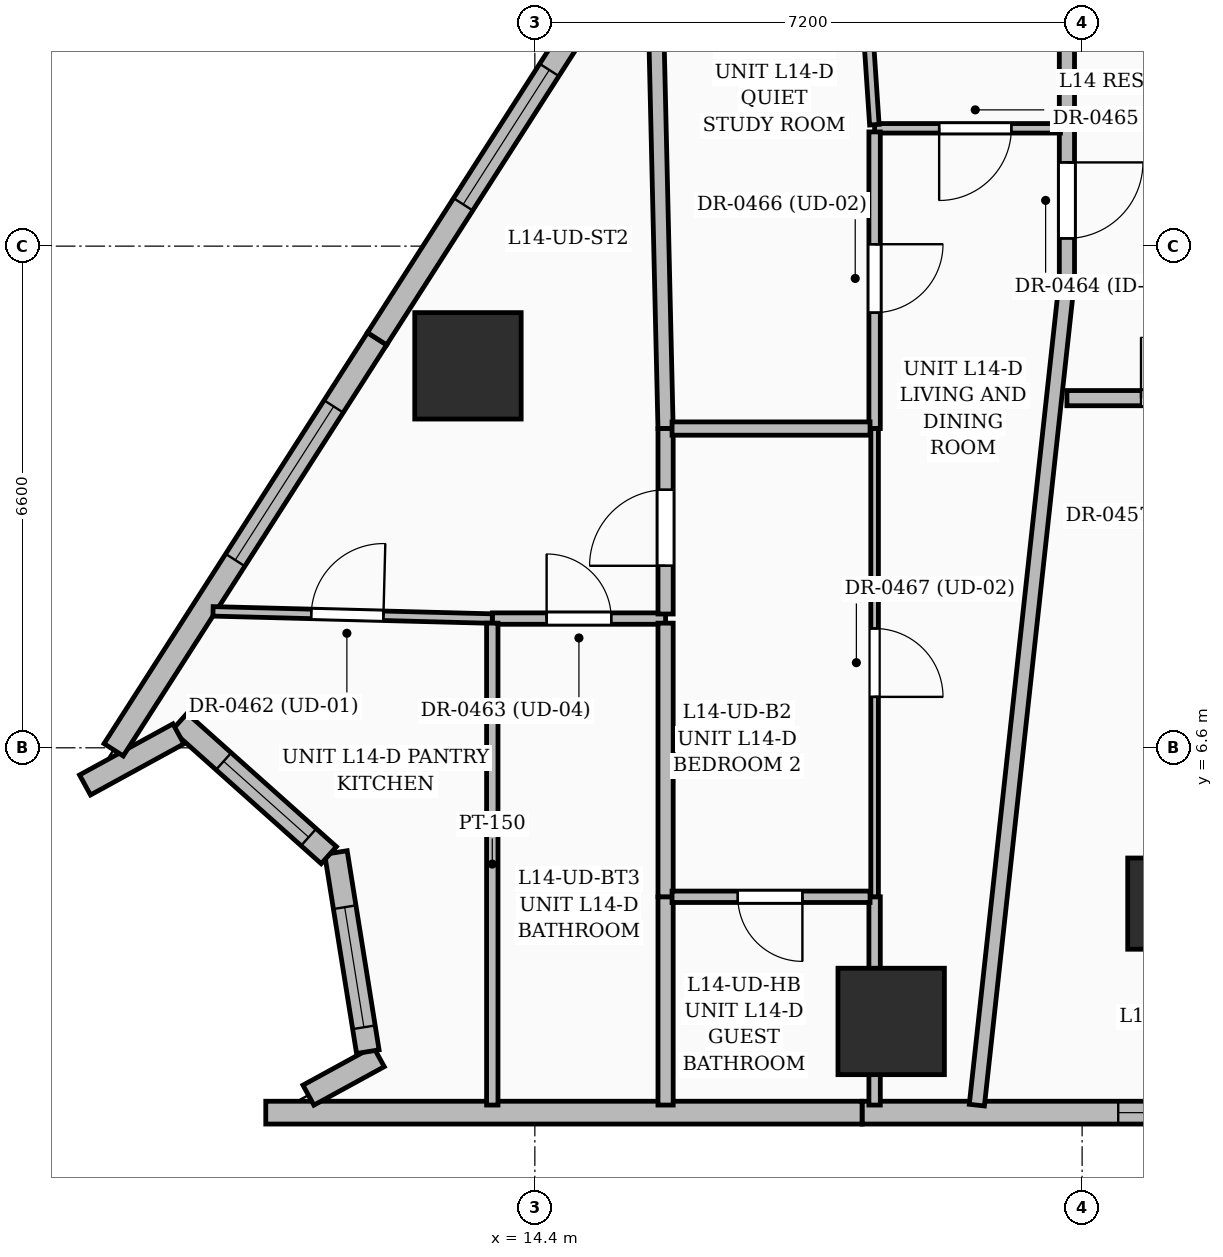
"""IFC4 building model, lengths in metres.
Left out: names, types, materials, properties, quantities, classifications, styles, units other than length and angle.
Written with IfcOpenShell. Run it as: python <this file> out.ifc"""

import sys

from ifc_helpers import new_model, si_unit, direction, frame, frame_2d, origin, origin_2d, place, context, subcontext, project, spatial, rectangle, extrude, element, fill, save


model = new_model("IFC4")
c1 = context("Model", 3, precision=1e-05, world=origin(), true_north=direction((0.0, 1.0)))
c2 = subcontext(c1, "Body", "Model", "MODEL_VIEW")
j1 = project(units=[si_unit("LENGTHUNIT", "METRE"), si_unit("PLANEANGLEUNIT", "RADIAN")], contexts=[c1])
p1 = place(None, origin())
s1 = spatial("IfcSite", under=j1, at=p1, CompositionType="ELEMENT")
p2 = place(p1, origin())
s2 = spatial("IfcBuilding", under=s1, at=p2, CompositionType="ELEMENT")
p3 = place(p2, frame((0.0, 0.0, 60.6)))
s3 = spatial("IfcBuildingStorey", under=s2, at=p3, CompositionType="ELEMENT", Elevation=60.6)
p4 = place(p3, frame((22.8, 4.55, 0.0), z_axis=(0.0, 0.0, 1.0), x_axis=(1.0, 0.0, 0.0)))
e1 = element("IfcColumn", 1, at=p4, inside=s3, PredefinedType="COLUMN", context=c2, shape_type="SweptSolid", body=[
    extrude(rectangle(XDim=1.2, YDim=1.2, at=origin_2d()), origin(), (0.0, 0.0, 1.0), 3.6),
])
for number, where, z_axis, x_axis in (
    (2, (19.088, 3.0, 0.0), (0.0, 0.0, 1.0), (1.0, 0.0, 0.0)),
    (3, (13.52, 11.625, 0.0), (0.0, 0.0, 1.0), (1.0, 0.0, 0.0)),
):
    element("IfcColumn", number, at=place(p3, frame(where, z_axis=z_axis, x_axis=x_axis)), inside=s3, PredefinedType="COLUMN", context=c2, shape_type="SweptSolid", body=[
        extrude(rectangle(XDim=1.4, YDim=1.4, at=origin_2d()), origin(), (0.0, 0.0, 1.0), 3.6),
    ])
p5 = place(p3, frame((26.55, 1.8, 0.0), z_axis=(0.0, 0.0, 1.0), x_axis=(-1.0, 0.0, 0.0)))
e4 = element("IfcWall", 4, at=p5, inside=s3, PredefinedType="SOLIDWALL", context=c2, shape_type="SweptSolid", body=[
    extrude(rectangle(XDim=7.845, YDim=0.3, at=frame_2d((3.922, 0.0))), origin(), (0.0, 0.0, 1.0), 3.35),
])
p6 = place(p5, frame((2.075, 0.0, 0.6)))
e5 = element("IfcOpeningElement", 5, at=p6, cuts=e4, PredefinedType="OPENING", context=c2, shape_type="SweptSolid", body=[
    extrude(rectangle(XDim=2.4, YDim=2.1, at=frame_2d((1.2, 1.05))), frame((0.0, 0.16, 0.0), z_axis=(0.0, -1.0, 0.0), x_axis=(1.0, 0.0, 0.0)), (0.0, 0.0, 1.0), 0.32),
])
p7 = place(p3, frame((18.705, 1.8, 0.0), z_axis=(0.0, 0.0, 1.0), x_axis=(-1.0, 0.0, 0.0)))
e6 = element("IfcWall", 6, at=p7, inside=s3, PredefinedType="SOLIDWALL", context=c2, shape_type="SweptSolid", body=[
    extrude(rectangle(XDim=7.845, YDim=0.3, at=frame_2d((3.922, 0.0))), origin(), (0.0, 0.0, 1.0), 3.35),
])
p8 = place(p3, frame((11.421, 2.03, 0.0), z_axis=(0.0, 0.0, 1.0), x_axis=(0.877488347229, 0.479597957124, 0.0)))
e7 = element("IfcWall", 7, at=p8, inside=s3, PredefinedType="SOLIDWALL", context=c2, shape_type="SweptSolid", body=[
    extrude(rectangle(XDim=1.055, YDim=0.3, at=frame_2d((0.527, 0.0))), origin(), (0.0, 0.0, 1.0), 3.35),
])
p9 = place(p3, frame((12.203, 2.602, 0.0), z_axis=(0.0, 0.0, 1.0), x_axis=(-0.158173523246, 0.987411330978, 0.0)))
e8 = element("IfcWall", 8, at=p9, inside=s3, PredefinedType="SOLIDWALL", context=c2, shape_type="SweptSolid", body=[
    extrude(rectangle(XDim=2.653, YDim=0.3, at=frame_2d((1.327, 0.0))), origin(), (0.0, 0.0, 1.0), 3.35),
])
p10 = place(p9, frame((0.325, 0.0, 0.55)))
e9 = element("IfcOpeningElement", 9, at=p10, cuts=e8, PredefinedType="OPENING", context=c2, shape_type="SweptSolid", body=[
    extrude(rectangle(XDim=1.6, YDim=2.2, at=frame_2d((0.8, 1.1))), frame((0.0, 0.16, 0.0), z_axis=(0.0, -1.0, 0.0), x_axis=(1.0, 0.0, 0.0)), (0.0, 0.0, 1.0), 0.32),
])
p11 = place(p3, frame((11.689, 5.187, 0.0), z_axis=(0.0, 0.0, 1.0), x_axis=(-0.745975491387, 0.665973397555, 0.0)))
e10 = element("IfcWall", 10, at=p11, inside=s3, PredefinedType="SOLIDWALL", context=c2, shape_type="SweptSolid", body=[
    extrude(rectangle(XDim=2.634, YDim=0.3, at=frame_2d((1.317, 0.0))), origin(), (0.0, 0.0, 1.0), 3.35),
])
p12 = place(p11, frame((0.355, 0.0, 0.6)))
e11 = element("IfcOpeningElement", 11, at=p12, cuts=e10, PredefinedType="OPENING", context=c2, shape_type="SweptSolid", body=[
    extrude(rectangle(XDim=1.5, YDim=2.1, at=frame_2d((0.75, 1.05))), frame((0.0, 0.16, 0.0), z_axis=(0.0, -1.0, 0.0), x_axis=(1.0, 0.0, 0.0)), (0.0, 0.0, 1.0), 0.32),
])
p13 = place(p3, frame((9.711, 6.783, 0.0), z_axis=(0.0, 0.0, 1.0), x_axis=(-0.877215145436, -0.480097478245, 0.0)))
e12 = element("IfcWall", 12, at=p13, inside=s3, PredefinedType="SOLIDWALL", context=c2, shape_type="SweptSolid", body=[
    extrude(rectangle(XDim=1.4, YDim=0.3, at=frame_2d((0.7, 0.0))), origin(), (0.0, 0.0, 1.0), 3.35),
])
p14 = place(p3, frame((8.859, 6.574, 0.0), z_axis=(0.0, 0.0, 1.0), x_axis=(0.539539001193, 0.841960608456, 0.0)))
e13 = element("IfcWall", 13, at=p14, inside=s3, PredefinedType="SOLIDWALL", context=c2, shape_type="SweptSolid", body=[
    extrude(rectangle(XDim=6.423, YDim=0.3, at=frame_2d((3.211, 0.0))), origin(), (0.0, 0.0, 1.0), 3.35),
])
p15 = place(p14, frame((2.965, 0.0, 0.6)))
e14 = element("IfcOpeningElement", 14, at=p15, cuts=e13, PredefinedType="OPENING", context=c2, shape_type="SweptSolid", body=[
    extrude(rectangle(XDim=2.4, YDim=2.1, at=frame_2d((1.2, 1.05))), frame((0.0, 0.16, 0.0), z_axis=(0.0, -1.0, 0.0), x_axis=(1.0, 0.0, 0.0)), (0.0, 0.0, 1.0), 0.32),
])
p16 = place(p3, frame((12.324, 11.981, 0.0), z_axis=(0.0, 0.0, 1.0), x_axis=(0.539544650361, 0.841956988371, 0.0)))
e15 = element("IfcWall", 15, at=p16, inside=s3, PredefinedType="SOLIDWALL", context=c2, shape_type="SweptSolid", body=[
    extrude(rectangle(XDim=6.758, YDim=0.3, at=frame_2d((3.379, 0.0))), origin(), (0.0, 0.0, 1.0), 3.35),
])
p17 = place(p16, frame((2.1, 0.0, 0.55)))
e16 = element("IfcOpeningElement", 16, at=p17, cuts=e15, PredefinedType="OPENING", context=c2, shape_type="SweptSolid", body=[
    extrude(rectangle(XDim=2.1, YDim=2.4, at=frame_2d((1.05, 1.2))), frame((0.0, 0.16, 0.0), z_axis=(0.0, -1.0, 0.0), x_axis=(1.0, 0.0, 0.0)), (0.0, 0.0, 1.0), 0.32),
])
p18 = place(p3, frame((21.4, 11.2, 0.0), z_axis=(0.0, 0.0, 1.0), x_axis=(1.0, 0.0, 0.0)))
e17 = element("IfcWall", 17, at=p18, inside=s3, PredefinedType="PARTITIONING", context=c2, shape_type="SweptSolid", body=[
    extrude(rectangle(XDim=3.469, YDim=0.2, at=frame_2d((1.735, 0.0))), origin(), (0.0, 0.0, 1.0), 2.712),
])
p19 = place(p18, frame((0.975, 0.0, 0.0)))
e18 = element("IfcOpeningElement", 18, at=p19, cuts=e17, PredefinedType="OPENING", context=c2, shape_type="SweptSolid", body=[
    extrude(rectangle(XDim=1.6, YDim=2.3, at=frame_2d((0.8, 1.15))), frame((0.0, 0.11, 0.0), z_axis=(0.0, -1.0, 0.0), x_axis=(1.0, 0.0, 0.0)), (0.0, 0.0, 1.0), 0.22),
])
p20 = place(p3, frame((21.4, 14.75, 0.0), z_axis=(0.0, 0.0, 1.0), x_axis=(0.0, -1.0, 0.0)))
e19 = element("IfcWall", 19, at=p20, inside=s3, PredefinedType="PARTITIONING", context=c2, shape_type="SweptSolid", body=[
    extrude(rectangle(XDim=2.0, YDim=0.2, at=frame_2d((1.0, 0.0))), origin(), (0.0, 0.0, 1.0), 2.712),
])
p21 = place(p20, frame((0.448, 0.0, 0.0)))
e20 = element("IfcOpeningElement", 20, at=p21, cuts=e19, PredefinedType="OPENING", context=c2, shape_type="SweptSolid", body=[
    extrude(rectangle(XDim=1.0, YDim=2.2, at=frame_2d((0.5, 1.1))), frame((0.0, 0.11, 0.0), z_axis=(0.0, -1.0, 0.0), x_axis=(1.0, 0.0, 0.0)), (0.0, 0.0, 1.0), 0.22),
])
p22 = place(p3, frame((21.4, 17.75, 0.0), z_axis=(0.0, 0.0, 1.0), x_axis=(0.0, -1.0, 0.0)))
e21 = element("IfcWall", 21, at=p22, inside=s3, PredefinedType="PARTITIONING", context=c2, shape_type="SweptSolid", body=[
    extrude(rectangle(XDim=3.0, YDim=0.2, at=frame_2d((1.5, 0.0))), origin(), (0.0, 0.0, 1.0), 3.35),
])
p23 = place(p3, frame((13.84, 8.3, 0.0), z_axis=(0.0, 0.0, 1.0), x_axis=(1.0, 0.0, 0.0)))
e22 = element("IfcWall", 22, at=p23, inside=s3, PredefinedType="PARTITIONING", context=c2, shape_type="SweptSolid", body=[
    extrude(rectangle(XDim=2.28, YDim=0.15, at=frame_2d((1.14, 0.0))), origin(), (0.0, 0.0, 1.0), 2.37),
])
p24 = place(p23, frame((0.715, 0.0, 0.0)))
e23 = element("IfcOpeningElement", 23, at=p24, cuts=e22, PredefinedType="OPENING", context=c2, shape_type="SweptSolid", body=[
    extrude(rectangle(XDim=0.85, YDim=2.1, at=frame_2d((0.425, 1.05))), frame((0.0, 0.085, 0.0), z_axis=(0.0, -1.0, 0.0), x_axis=(1.0, 0.0, 0.0)), (0.0, 0.0, 1.0), 0.17),
])
p25 = place(p3, frame((10.166, 8.395, 0.0), z_axis=(0.0, 0.0, 1.0), x_axis=(0.999666084673, -0.025840262272, 0.0)))
e24 = element("IfcWall", 24, at=p25, inside=s3, PredefinedType="PARTITIONING", context=c2, shape_type="SweptSolid", body=[
    extrude(rectangle(XDim=3.675, YDim=0.125, at=frame_2d((1.838, 0.0))), origin(), (0.0, 0.0, 1.0), 3.35),
])
p26 = place(p25, frame((1.293, 0.0, 0.0)))
e25 = element("IfcOpeningElement", 25, at=p26, cuts=e24, PredefinedType="OPENING", context=c2, shape_type="SweptSolid", body=[
    extrude(rectangle(XDim=0.95, YDim=2.2, at=frame_2d((0.475, 1.1))), frame((0.0, 0.072, 0.0), z_axis=(0.0, -1.0, 0.0), x_axis=(1.0, 0.0, 0.0)), (0.0, 0.0, 1.0), 0.145),
])
p27 = place(p3, frame((16.12, 10.8, 0.0), z_axis=(0.0, 0.0, 1.0), x_axis=(-0.023345842867, 0.999727448668, 0.0)))
e26 = element("IfcWall", 26, at=p27, inside=s3, PredefinedType="PARTITIONING", context=c2, shape_type="SweptSolid", body=[
    extrude(rectangle(XDim=6.599, YDim=0.2, at=frame_2d((3.299, 0.0))), origin(), (0.0, 0.0, 1.0), 2.279),
])
p28 = place(p3, frame((16.12, 8.36, 0.0), z_axis=(0.0, 0.0, 1.0), x_axis=(0.0, 1.0, 0.0)))
e27 = element("IfcWall", 27, at=p28, inside=s3, PredefinedType="PARTITIONING", context=c2, shape_type="SweptSolid", body=[
    extrude(rectangle(XDim=2.44, YDim=0.2, at=frame_2d((1.22, 0.0))), origin(), (0.0, 0.0, 1.0), 2.279),
])
p29 = place(p28, frame((0.635, 0.0, 0.0)))
e28 = element("IfcOpeningElement", 28, at=p29, cuts=e27, PredefinedType="OPENING", context=c2, shape_type="SweptSolid", body=[
    extrude(rectangle(XDim=1.0, YDim=2.2, at=frame_2d((0.5, 1.1))), frame((0.0, 0.11, 0.0), z_axis=(0.0, -1.0, 0.0), x_axis=(1.0, 0.0, 0.0)), (0.0, 0.0, 1.0), 0.22),
])
p30 = place(p3, frame((13.84, 8.24, 0.0), z_axis=(0.0, 0.0, 1.0), x_axis=(0.0, -1.0, 0.0)))
e29 = element("IfcWall", 29, at=p30, inside=s3, PredefinedType="PARTITIONING", context=c2, shape_type="SweptSolid", body=[
    extrude(rectangle(XDim=6.34, YDim=0.15, at=frame_2d((3.17, 0.0))), origin(), (0.0, 0.0, 1.0), 3.35),
])
p31 = place(p3, frame((16.12, 1.9, 0.0), z_axis=(0.0, 0.0, 1.0), x_axis=(0.0, 1.0, 0.0)))
e30 = element("IfcWall", 30, at=p31, inside=s3, PredefinedType="PARTITIONING", context=c2, shape_type="SweptSolid", body=[
    extrude(rectangle(XDim=2.74, YDim=0.2, at=frame_2d((1.37, 0.0))), origin(), (0.0, 0.0, 1.0), 3.35),
])
p32 = place(p3, frame((16.12, 4.64, 0.0), z_axis=(0.0, 0.0, 1.0), x_axis=(0.0, 1.0, 0.0)))
e31 = element("IfcWall", 31, at=p32, inside=s3, PredefinedType="PARTITIONING", context=c2, shape_type="SweptSolid", body=[
    extrude(rectangle(XDim=3.6, YDim=0.2, at=frame_2d((1.8, 0.0))), origin(), (0.0, 0.0, 1.0), 2.37),
])
p33 = place(p3, frame((21.4, 12.75, 0.0), z_axis=(0.0, 0.0, 1.0), x_axis=(-0.108543558266, -0.994091693939, 0.0)))
e32 = element("IfcWall", 32, at=p33, inside=s3, PredefinedType="PARTITIONING", context=c2, shape_type="SweptSolid", body=[
    extrude(rectangle(XDim=10.916, YDim=0.2, at=frame_2d((5.458, 0.0))), origin(), (0.0, 0.0, 1.0), 2.279),
])
p34 = place(p3, frame((18.87, 4.64, 0.0), z_axis=(0.0, 0.0, 1.0), x_axis=(0.0, -1.0, 0.0)))
e33 = element("IfcWall", 33, at=p34, inside=s3, PredefinedType="PARTITIONING", context=c2, shape_type="SweptSolid", body=[
    extrude(rectangle(XDim=2.74, YDim=0.15, at=frame_2d((1.37, 0.0))), origin(), (0.0, 0.0, 1.0), 2.37),
])
p35 = place(p3, frame((21.315, 14.75, 0.0), z_axis=(0.0, 0.0, 1.0), x_axis=(-1.0, 0.0, 0.0)))
e34 = element("IfcWall", 34, at=p35, inside=s3, PredefinedType="PARTITIONING", context=c2, shape_type="SweptSolid", body=[
    extrude(rectangle(XDim=2.445, YDim=0.125, at=frame_2d((1.222, 0.0))), origin(), (0.0, 0.0, 1.0), 2.712),
])
p36 = place(p35, frame((0.646, 0.0, 0.0)))
e35 = element("IfcOpeningElement", 35, at=p36, cuts=e34, PredefinedType="OPENING", context=c2, shape_type="SweptSolid", body=[
    extrude(rectangle(XDim=0.95, YDim=2.2, at=frame_2d((0.475, 1.1))), frame((0.0, 0.072, 0.0), z_axis=(0.0, -1.0, 0.0), x_axis=(1.0, 0.0, 0.0)), (0.0, 0.0, 1.0), 0.145),
])
p37 = place(p3, frame((18.87, 14.702, 0.0), z_axis=(0.0, 0.0, 1.0), x_axis=(0.0, -1.0, 0.0)))
e36 = element("IfcWall", 36, at=p37, inside=s3, PredefinedType="PARTITIONING", context=c2, shape_type="SweptSolid", body=[
    extrude(rectangle(XDim=3.902, YDim=0.15, at=frame_2d((1.951, 0.0))), origin(), (0.0, 0.0, 1.0), 2.712),
])
p38 = place(p37, frame((1.478, 0.0, 0.0)))
e37 = element("IfcOpeningElement", 37, at=p38, cuts=e36, PredefinedType="OPENING", context=c2, shape_type="SweptSolid", body=[
    extrude(rectangle(XDim=0.9, YDim=2.15, at=frame_2d((0.45, 1.075))), frame((0.0, 0.085, 0.0), z_axis=(0.0, -1.0, 0.0), x_axis=(1.0, 0.0, 0.0)), (0.0, 0.0, 1.0), 0.17),
])
p39 = place(p3, frame((18.87, 10.8, 0.0), z_axis=(0.0, 0.0, 1.0), x_axis=(0.0, -1.0, 0.0)))
e38 = element("IfcWall", 38, at=p39, inside=s3, PredefinedType="PARTITIONING", context=c2, shape_type="SweptSolid", body=[
    extrude(rectangle(XDim=6.16, YDim=0.1, at=frame_2d((3.08, 0.0))), origin(), (0.0, 0.0, 1.0), 2.279),
])
p40 = place(p39, frame((2.63, 0.0, 0.0)))
e39 = element("IfcOpeningElement", 39, at=p40, cuts=e38, PredefinedType="OPENING", context=c2, shape_type="SweptSolid", body=[
    extrude(rectangle(XDim=0.9, YDim=2.15, at=frame_2d((0.45, 1.075))), frame((0.0, 0.06, 0.0), z_axis=(0.0, -1.0, 0.0), x_axis=(1.0, 0.0, 0.0)), (0.0, 0.0, 1.0), 0.12),
])
p41 = place(p3, frame((18.81, 4.64, 0.0), z_axis=(0.0, 0.0, 1.0), x_axis=(-1.0, 0.0, 0.0)))
e40 = element("IfcWall", 40, at=p41, inside=s3, PredefinedType="PARTITIONING", context=c2, shape_type="SweptSolid", body=[
    extrude(rectangle(XDim=2.605, YDim=0.15, at=frame_2d((1.302, 0.0))), origin(), (0.0, 0.0, 1.0), 2.37),
])
p42 = place(p41, frame((0.89, 0.0, 0.0)))
e41 = element("IfcOpeningElement", 41, at=p42, cuts=e40, PredefinedType="OPENING", context=c2, shape_type="SweptSolid", body=[
    extrude(rectangle(XDim=0.85, YDim=2.1, at=frame_2d((0.425, 1.05))), frame((0.0, 0.085, 0.0), z_axis=(0.0, -1.0, 0.0), x_axis=(1.0, 0.0, 0.0)), (0.0, 0.0, 1.0), 0.17),
])
p43 = place(p3, frame((18.66, 17.885, 0.0), z_axis=(0.0, 0.0, 1.0), x_axis=(0.066822712134, -0.997764864656, 0.0)))
e42 = element("IfcWall", 42, at=p43, inside=s3, PredefinedType="PARTITIONING", context=c2, shape_type="SweptSolid", body=[
    extrude(rectangle(XDim=3.094, YDim=0.125, at=frame_2d((1.547, 0.0))), origin(), (0.0, 0.0, 1.0), 3.35),
])
p44 = place(p3, frame((16.205, 10.8, 0.0), z_axis=(0.0, 0.0, 1.0), x_axis=(1.0, 0.0, 0.0)))
e43 = element("IfcWall", 43, at=p44, inside=s3, PredefinedType="PARTITIONING", context=c2, shape_type="SweptSolid", body=[
    extrude(rectangle(XDim=2.605, YDim=0.175, at=frame_2d((1.302, 0.0))), origin(), (0.0, 0.0, 1.0), 2.279),
])
p45 = place(p6, origin())
e44 = element("IfcWindow", 44, at=p45, inside=s3, PartitioningType="SINGLE_PANEL", PredefinedType="WINDOW", context=c2, shape_type="SweptSolid", body=[
    extrude(rectangle(XDim=2.4, YDim=2.1, at=frame_2d((1.2, 1.05))), frame((0.0, 0.03, 0.0), z_axis=(0.0, -1.0, 0.0), x_axis=(1.0, 0.0, 0.0)), (0.0, 0.0, 1.0), 0.06),
])
fill(e5, e44)
p46 = place(p10, origin())
e45 = element("IfcWindow", 45, at=p46, inside=s3, PartitioningType="SINGLE_PANEL", PredefinedType="WINDOW", context=c2, shape_type="SweptSolid", body=[
    extrude(rectangle(XDim=1.6, YDim=2.2, at=frame_2d((0.8, 1.1))), frame((0.0, 0.03, 0.0), z_axis=(0.0, -1.0, 0.0), x_axis=(1.0, 0.0, 0.0)), (0.0, 0.0, 1.0), 0.06),
])
fill(e9, e45)
p47 = place(p12, origin())
e46 = element("IfcWindow", 46, at=p47, inside=s3, PartitioningType="SINGLE_PANEL", PredefinedType="WINDOW", context=c2, shape_type="SweptSolid", body=[
    extrude(rectangle(XDim=1.5, YDim=2.1, at=frame_2d((0.75, 1.05))), frame((0.0, 0.03, 0.0), z_axis=(0.0, -1.0, 0.0), x_axis=(1.0, 0.0, 0.0)), (0.0, 0.0, 1.0), 0.06),
])
fill(e11, e46)
p48 = place(p15, origin())
e47 = element("IfcWindow", 47, at=p48, inside=s3, PartitioningType="SINGLE_PANEL", PredefinedType="WINDOW", context=c2, shape_type="SweptSolid", body=[
    extrude(rectangle(XDim=2.4, YDim=2.1, at=frame_2d((1.2, 1.05))), frame((0.0, 0.03, 0.0), z_axis=(0.0, -1.0, 0.0), x_axis=(1.0, 0.0, 0.0)), (0.0, 0.0, 1.0), 0.06),
])
fill(e14, e47)
p49 = place(p17, origin())
e48 = element("IfcWindow", 48, at=p49, inside=s3, PartitioningType="SINGLE_PANEL", PredefinedType="WINDOW", context=c2, shape_type="SweptSolid", body=[
    extrude(rectangle(XDim=2.1, YDim=2.4, at=frame_2d((1.05, 1.2))), frame((0.0, 0.03, 0.0), z_axis=(0.0, -1.0, 0.0), x_axis=(1.0, 0.0, 0.0)), (0.0, 0.0, 1.0), 0.06),
])
fill(e16, e48)
p50 = place(p19, origin())
e49 = element("IfcDoor", 49, at=p50, inside=s3, OperationType="DOUBLE_DOOR_SINGLE_SWING", PredefinedType="DOOR", context=c2, shape_type="SweptSolid", body=[
    extrude(rectangle(XDim=1.6, YDim=2.3, at=frame_2d((0.8, 1.15))), frame((0.0, 0.025, 0.0), z_axis=(0.0, -1.0, 0.0), x_axis=(1.0, 0.0, 0.0)), (0.0, 0.0, 1.0), 0.05),
])
fill(e18, e49)
p51 = place(p26, origin())
e50 = element("IfcDoor", 50, at=p51, inside=s3, OperationType="SINGLE_SWING_RIGHT", PredefinedType="DOOR", context=c2, shape_type="SweptSolid", body=[
    extrude(rectangle(XDim=0.95, YDim=2.2, at=frame_2d((0.475, 1.1))), frame((0.0, 0.025, 0.0), z_axis=(0.0, -1.0, 0.0), x_axis=(1.0, 0.0, 0.0)), (0.0, 0.0, 1.0), 0.05),
])
fill(e25, e50)
p52 = place(p24, origin())
e51 = element("IfcDoor", 51, at=p52, inside=s3, OperationType="SINGLE_SWING_LEFT", PredefinedType="DOOR", context=c2, shape_type="SweptSolid", body=[
    extrude(rectangle(XDim=0.85, YDim=2.1, at=frame_2d((0.425, 1.05))), frame((0.0, 0.025, 0.0), z_axis=(0.0, -1.0, 0.0), x_axis=(1.0, 0.0, 0.0)), (0.0, 0.0, 1.0), 0.05),
])
fill(e23, e51)
p53 = place(p21, origin())
e52 = element("IfcDoor", 52, at=p53, inside=s3, OperationType="SINGLE_SWING_LEFT", PredefinedType="DOOR", context=c2, shape_type="SweptSolid", body=[
    extrude(rectangle(XDim=1.0, YDim=2.2, at=frame_2d((0.5, 1.1))), frame((0.0, 0.025, 0.0), z_axis=(0.0, -1.0, 0.0), x_axis=(1.0, 0.0, 0.0)), (0.0, 0.0, 1.0), 0.05),
])
fill(e20, e52)
p54 = place(p36, origin())
e53 = element("IfcDoor", 53, at=p54, inside=s3, OperationType="SINGLE_SWING_RIGHT", PredefinedType="DOOR", context=c2, shape_type="SweptSolid", body=[
    extrude(rectangle(XDim=0.95, YDim=2.2, at=frame_2d((0.475, 1.1))), frame((0.0, 0.025, 0.0), z_axis=(0.0, -1.0, 0.0), x_axis=(1.0, 0.0, 0.0)), (0.0, 0.0, 1.0), 0.05),
])
fill(e35, e53)
p55 = place(p38, origin())
e54 = element("IfcDoor", 54, at=p55, inside=s3, OperationType="SINGLE_SWING_LEFT", PredefinedType="DOOR", context=c2, shape_type="SweptSolid", body=[
    extrude(rectangle(XDim=0.9, YDim=2.15, at=frame_2d((0.45, 1.075))), frame((0.0, 0.025, 0.0), z_axis=(0.0, -1.0, 0.0), x_axis=(1.0, 0.0, 0.0)), (0.0, 0.0, 1.0), 0.05),
])
fill(e37, e54)
p56 = place(p40, origin())
e55 = element("IfcDoor", 55, at=p56, inside=s3, OperationType="SINGLE_SWING_RIGHT", PredefinedType="DOOR", context=c2, shape_type="SweptSolid", body=[
    extrude(rectangle(XDim=0.9, YDim=2.15, at=frame_2d((0.45, 1.075))), frame((0.0, 0.025, 0.0), z_axis=(0.0, -1.0, 0.0), x_axis=(1.0, 0.0, 0.0)), (0.0, 0.0, 1.0), 0.05),
])
fill(e39, e55)
p57 = place(p29, origin())
e56 = element("IfcDoor", 56, at=p57, inside=s3, OperationType="SINGLE_SWING_LEFT", PredefinedType="DOOR", context=c2, shape_type="SweptSolid", body=[
    extrude(rectangle(XDim=1.0, YDim=2.2, at=frame_2d((0.5, 1.1))), frame((0.0, 0.025, 0.0), z_axis=(0.0, -1.0, 0.0), x_axis=(1.0, 0.0, 0.0)), (0.0, 0.0, 1.0), 0.05),
])
fill(e28, e56)
p58 = place(p42, origin())
e57 = element("IfcDoor", 57, at=p58, inside=s3, OperationType="SINGLE_SWING_LEFT", PredefinedType="DOOR", context=c2, shape_type="SweptSolid", body=[
    extrude(rectangle(XDim=0.85, YDim=2.1, at=frame_2d((0.425, 1.05))), frame((0.0, 0.025, 0.0), z_axis=(0.0, -1.0, 0.0), x_axis=(1.0, 0.0, 0.0)), (0.0, 0.0, 1.0), 0.05),
])
fill(e41, e57)
save(model, sys.argv[1])
